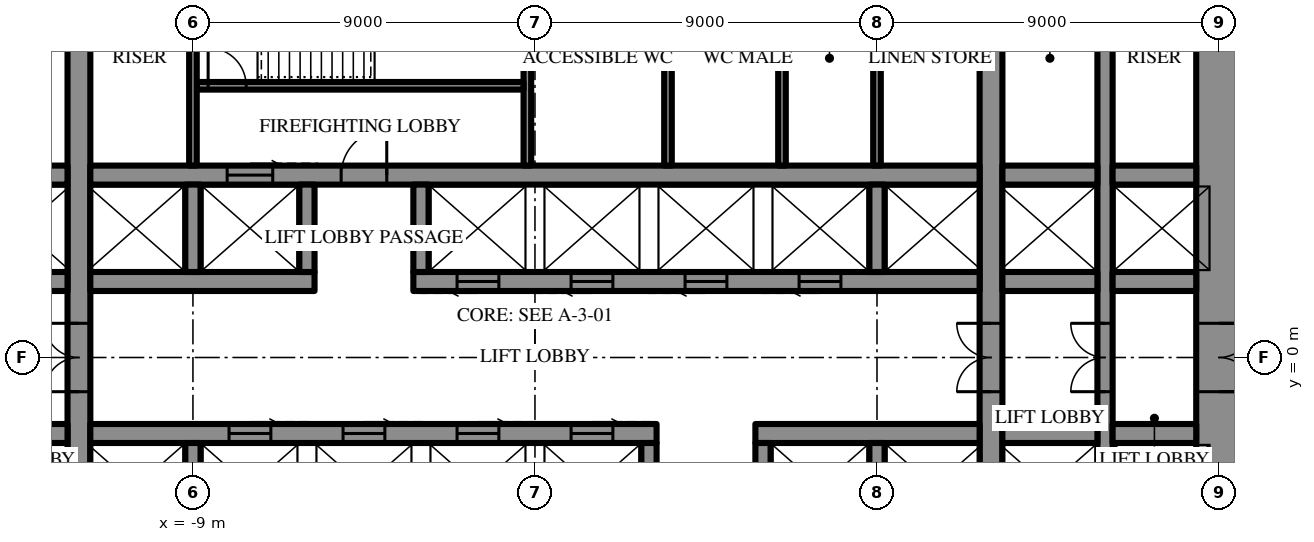
"""IFC4 building model, lengths in metres.
Left out: names, types, materials, properties, quantities, classifications, styles, units other than length and angle.
Written with IfcOpenShell. Run it as: python <this file> out.ifc"""

import sys

from ifc_helpers import new_model, si_unit, direction, frame, frame_2d, origin, place, context, subcontext, project, spatial, rectangle, extrude, element, fill, save


model = new_model("IFC4")
c1 = context("Model", 3, precision=1e-05, world=origin(), true_north=direction((0.0, 1.0)))
c2 = subcontext(c1, "Body", "Model", "MODEL_VIEW")
j1 = project(units=[si_unit("LENGTHUNIT", "METRE"), si_unit("PLANEANGLEUNIT", "RADIAN")], contexts=[c1])
p1 = place(None, origin())
s1 = spatial("IfcSite", under=j1, at=p1, CompositionType="ELEMENT")
p2 = place(p1, origin())
s2 = spatial("IfcBuilding", under=s1, at=p2, CompositionType="ELEMENT")
p3 = place(p2, frame((0.0, 0.0, 82.3)))
s3 = spatial("IfcBuildingStorey", under=s2, at=p3, CompositionType="ELEMENT", Elevation=82.3)
p4 = place(p3, frame((18.0, -10.7, 0.0), z_axis=(0.0, 0.0, 1.0), x_axis=(0.0, 1.0, 0.0)))
e1 = element("IfcWall", 1, at=p4, inside=s3, PredefinedType="SHEAR", context=c2, shape_type="SweptSolid", body=[
    extrude(rectangle(XDim=21.4, YDim=1.2, at=frame_2d((10.7, 0.0))), origin(), (0.0, 0.0, 1.0), 4.2),
])
p5 = place(p4, frame((9.8, 0.0, 0.0)))
e2 = element("IfcOpeningElement", 2, at=p5, cuts=e1, PredefinedType="OPENING", context=c2, shape_type="SweptSolid", body=[
    extrude(rectangle(XDim=1.8, YDim=2.4, at=frame_2d((0.9, 1.2))), frame((0.0, 0.61, 0.0), z_axis=(0.0, -1.0, 0.0), x_axis=(1.0, 0.0, 0.0)), (0.0, 0.0, 1.0), 1.22),
])
p6 = place(p3, frame((12.0, -10.7, 0.0), z_axis=(0.0, 0.0, 1.0), x_axis=(0.0, 1.0, 0.0)))
e3 = element("IfcWall", 3, at=p6, inside=s3, PredefinedType="SHEAR", context=c2, shape_type="SweptSolid", body=[
    extrude(rectangle(XDim=21.4, YDim=0.6, at=frame_2d((10.7, 0.0))), origin(), (0.0, 0.0, 1.0), 4.2),
])
p7 = place(p6, frame((9.8, 0.0, 0.0)))
e4 = element("IfcOpeningElement", 4, at=p7, cuts=e3, PredefinedType="OPENING", context=c2, shape_type="SweptSolid", body=[
    extrude(rectangle(XDim=1.8, YDim=2.4, at=frame_2d((0.9, 1.2))), frame((0.0, 0.31, 0.0), z_axis=(0.0, -1.0, 0.0), x_axis=(1.0, 0.0, 0.0)), (0.0, 0.0, 1.0), 0.62),
])
p8 = place(p3, frame((-12.0, -10.7, 0.0), z_axis=(0.0, 0.0, 1.0), x_axis=(0.0, 1.0, 0.0)))
e5 = element("IfcWall", 5, at=p8, inside=s3, PredefinedType="SHEAR", context=c2, shape_type="SweptSolid", body=[
    extrude(rectangle(XDim=21.4, YDim=0.6, at=frame_2d((10.7, 0.0))), origin(), (0.0, 0.0, 1.0), 4.2),
])
p9 = place(p8, frame((9.8, 0.0, 0.0)))
e6 = element("IfcOpeningElement", 6, at=p9, cuts=e5, PredefinedType="OPENING", context=c2, shape_type="SweptSolid", body=[
    extrude(rectangle(XDim=1.8, YDim=2.4, at=frame_2d((0.9, 1.2))), frame((0.0, 0.31, 0.0), z_axis=(0.0, -1.0, 0.0), x_axis=(1.0, 0.0, 0.0)), (0.0, 0.0, 1.0), 0.62),
])
p10 = place(p3, frame((15.0, -10.7, 0.0), z_axis=(0.0, 0.0, 1.0), x_axis=(0.0, 1.0, 0.0)))
e7 = element("IfcWall", 7, at=p10, inside=s3, PredefinedType="SHEAR", context=c2, shape_type="SweptSolid", body=[
    extrude(rectangle(XDim=21.4, YDim=0.4, at=frame_2d((10.7, 0.0))), origin(), (0.0, 0.0, 1.0), 4.2),
])
p11 = place(p10, frame((9.8, 0.0, 0.0)))
e8 = element("IfcOpeningElement", 8, at=p11, cuts=e7, PredefinedType="OPENING", context=c2, shape_type="SweptSolid", body=[
    extrude(rectangle(XDim=1.8, YDim=2.4, at=frame_2d((0.9, 1.2))), frame((0.0, 0.21, 0.0), z_axis=(0.0, -1.0, 0.0), x_axis=(1.0, 0.0, 0.0)), (0.0, 0.0, 1.0), 0.42),
])
p12 = place(p3, frame((-14.8, 2.0, 0.0), z_axis=(0.0, 0.0, 1.0), x_axis=(1.0, 0.0, 0.0)))
e9 = element("IfcWall", 9, at=p12, inside=s3, PredefinedType="SHEAR", context=c2, shape_type="SweptSolid", body=[
    extrude(rectangle(XDim=2.5, YDim=0.5, at=frame_2d((1.25, 0.0))), origin(), (0.0, 0.0, 1.0), 4.2),
])
p13 = place(p3, frame((-11.7, 2.0, 0.0), z_axis=(0.0, 0.0, 1.0), x_axis=(1.0, 0.0, 0.0)))
e10 = element("IfcWall", 10, at=p13, inside=s3, PredefinedType="SHEAR", context=c2, shape_type="SweptSolid", body=[
    extrude(rectangle(XDim=5.9, YDim=0.5, at=frame_2d((2.95, 0.0))), origin(), (0.0, 0.0, 1.0), 4.2),
])
p14 = place(p3, frame((-3.2, 2.0, 0.0), z_axis=(0.0, 0.0, 1.0), x_axis=(1.0, 0.0, 0.0)))
e11 = element("IfcWall", 11, at=p14, inside=s3, PredefinedType="SHEAR", context=c2, shape_type="SweptSolid", body=[
    extrude(rectangle(XDim=14.9, YDim=0.5, at=frame_2d((7.45, 0.0))), origin(), (0.0, 0.0, 1.0), 4.2),
])
p15 = place(p14, frame((1.15, 0.0, 0.0)))
e12 = element("IfcOpeningElement", 12, at=p15, cuts=e11, PredefinedType="OPENING", context=c2, shape_type="SweptSolid", body=[
    extrude(rectangle(XDim=1.1, YDim=2.2, at=frame_2d((0.55, 1.1))), frame((0.0, 0.26, 0.0), z_axis=(0.0, -1.0, 0.0), x_axis=(1.0, 0.0, 0.0)), (0.0, 0.0, 1.0), 0.52),
])
p16 = place(p14, frame((4.15, 0.0, 0.0)))
e13 = element("IfcOpeningElement", 13, at=p16, cuts=e11, PredefinedType="OPENING", context=c2, shape_type="SweptSolid", body=[
    extrude(rectangle(XDim=1.1, YDim=2.2, at=frame_2d((0.55, 1.1))), frame((0.0, 0.26, 0.0), z_axis=(0.0, -1.0, 0.0), x_axis=(1.0, 0.0, 0.0)), (0.0, 0.0, 1.0), 0.52),
])
p17 = place(p14, frame((7.15, 0.0, 0.0)))
e14 = element("IfcOpeningElement", 14, at=p17, cuts=e11, PredefinedType="OPENING", context=c2, shape_type="SweptSolid", body=[
    extrude(rectangle(XDim=1.1, YDim=2.2, at=frame_2d((0.55, 1.1))), frame((0.0, 0.26, 0.0), z_axis=(0.0, -1.0, 0.0), x_axis=(1.0, 0.0, 0.0)), (0.0, 0.0, 1.0), 0.52),
])
p18 = place(p14, frame((10.15, 0.0, 0.0)))
e15 = element("IfcOpeningElement", 15, at=p18, cuts=e11, PredefinedType="OPENING", context=c2, shape_type="SweptSolid", body=[
    extrude(rectangle(XDim=1.1, YDim=2.2, at=frame_2d((0.55, 1.1))), frame((0.0, 0.26, 0.0), z_axis=(0.0, -1.0, 0.0), x_axis=(1.0, 0.0, 0.0)), (0.0, 0.0, 1.0), 0.52),
])
p19 = place(p3, frame((12.3, 2.0, 0.0), z_axis=(0.0, 0.0, 1.0), x_axis=(1.0, 0.0, 0.0)))
e16 = element("IfcWall", 16, at=p19, inside=s3, PredefinedType="SHEAR", context=c2, shape_type="SweptSolid", body=[
    extrude(rectangle(XDim=2.5, YDim=0.5, at=frame_2d((1.25, 0.0))), origin(), (0.0, 0.0, 1.0), 4.2),
])
p20 = place(p3, frame((15.2, 2.0, 0.0), z_axis=(0.0, 0.0, 1.0), x_axis=(1.0, 0.0, 0.0)))
e17 = element("IfcWall", 17, at=p20, inside=s3, PredefinedType="SHEAR", context=c2, shape_type="SweptSolid", body=[
    extrude(rectangle(XDim=2.2, YDim=0.5, at=frame_2d((1.1, 0.0))), origin(), (0.0, 0.0, 1.0), 4.2),
])
p21 = place(p3, frame((-14.8, 4.8, 0.0), z_axis=(0.0, 0.0, 1.0), x_axis=(1.0, 0.0, 0.0)))
e18 = element("IfcWall", 18, at=p21, inside=s3, PredefinedType="SHEAR", context=c2, shape_type="SweptSolid", body=[
    extrude(rectangle(XDim=2.5, YDim=0.5, at=frame_2d((1.25, 0.0))), origin(), (0.0, 0.0, 1.0), 4.2),
])
p22 = place(p3, frame((-11.7, 4.8, 0.0), z_axis=(0.0, 0.0, 1.0), x_axis=(1.0, 0.0, 0.0)))
e19 = element("IfcWall", 19, at=p22, inside=s3, PredefinedType="SHEAR", context=c2, shape_type="SweptSolid", body=[
    extrude(rectangle(XDim=23.4, YDim=0.5, at=frame_2d((11.7, 0.0))), origin(), (0.0, 0.0, 1.0), 4.2),
])
p23 = place(p22, frame((6.6, 0.0, 0.0)))
e20 = element("IfcOpeningElement", 20, at=p23, cuts=e19, PredefinedType="OPENING", context=c2, shape_type="SweptSolid", body=[
    extrude(rectangle(XDim=1.2, YDim=2.2, at=frame_2d((0.6, 1.1))), frame((0.0, 0.26, 0.0), z_axis=(0.0, -1.0, 0.0), x_axis=(1.0, 0.0, 0.0)), (0.0, 0.0, 1.0), 0.52),
])
p24 = place(p22, frame((3.6, 0.0, 0.0)))
e21 = element("IfcOpeningElement", 21, at=p24, cuts=e19, PredefinedType="OPENING", context=c2, shape_type="SweptSolid", body=[
    extrude(rectangle(XDim=1.2, YDim=2.2, at=frame_2d((0.6, 1.1))), frame((0.0, 0.26, 0.0), z_axis=(0.0, -1.0, 0.0), x_axis=(1.0, 0.0, 0.0)), (0.0, 0.0, 1.0), 0.52),
])
p25 = place(p3, frame((12.3, 4.8, 0.0), z_axis=(0.0, 0.0, 1.0), x_axis=(1.0, 0.0, 0.0)))
e22 = element("IfcWall", 22, at=p25, inside=s3, PredefinedType="SHEAR", context=c2, shape_type="SweptSolid", body=[
    extrude(rectangle(XDim=2.5, YDim=0.5, at=frame_2d((1.25, 0.0))), origin(), (0.0, 0.0, 1.0), 4.2),
])
p26 = place(p3, frame((15.2, 4.8, 0.0), z_axis=(0.0, 0.0, 1.0), x_axis=(1.0, 0.0, 0.0)))
e23 = element("IfcWall", 23, at=p26, inside=s3, PredefinedType="SHEAR", context=c2, shape_type="SweptSolid", body=[
    extrude(rectangle(XDim=2.2, YDim=0.5, at=frame_2d((1.1, 0.0))), origin(), (0.0, 0.0, 1.0), 4.2),
])
for number, where, z_axis, x_axis in (
    (24, (-9.0, 2.25, 0.0), (0.0, 0.0, 1.0), (0.0, 1.0, 0.0)),
    (25, (-6.0, 2.25, 0.0), (0.0, 0.0, 1.0), (0.0, 1.0, 0.0)),
    (26, (-3.0, 2.25, 0.0), (0.0, 0.0, 1.0), (0.0, 1.0, 0.0)),
    (27, (9.0, 2.25, 0.0), (0.0, 0.0, 1.0), (0.0, 1.0, 0.0)),
):
    element("IfcWall", number, at=place(p3, frame(where, z_axis=z_axis, x_axis=x_axis)), inside=s3, PredefinedType="SHEAR", context=c2, shape_type="SweptSolid", body=[
        extrude(rectangle(XDim=2.3, YDim=0.4, at=frame_2d((1.15, 0.0))), origin(), (0.0, 0.0, 1.0), 4.2),
    ])
p27 = place(p3, frame((-0.2, 5.05, 0.0), z_axis=(0.0, 0.0, 1.0), x_axis=(0.0, 1.0, 0.0)))
e28 = element("IfcWall", 28, at=p27, inside=s3, PredefinedType="SHEAR", context=c2, shape_type="SweptSolid", body=[
    extrude(rectangle(XDim=5.65, YDim=0.2, at=frame_2d((2.825, 0.0))), origin(), (0.0, 0.0, 1.0), 4.2),
])
p28 = place(p3, frame((-8.9, 7.15, 0.0), z_axis=(0.0, 0.0, 1.0), x_axis=(1.0, 0.0, 0.0)))
e29 = element("IfcWall", 29, at=p28, inside=s3, PredefinedType="SHEAR", context=c2, shape_type="SweptSolid", body=[
    extrude(rectangle(XDim=8.6, YDim=0.2, at=frame_2d((4.3, 0.0))), origin(), (0.0, 0.0, 1.0), 4.2),
])
p29 = place(p28, frame((0.3, 0.0, 0.0)))
e30 = element("IfcOpeningElement", 30, at=p29, cuts=e29, PredefinedType="OPENING", context=c2, shape_type="SweptSolid", body=[
    extrude(rectangle(XDim=1.0, YDim=2.2, at=frame_2d((0.5, 1.1))), frame((0.0, 0.11, 0.0), z_axis=(0.0, -1.0, 0.0), x_axis=(1.0, 0.0, 0.0)), (0.0, 0.0, 1.0), 0.22),
])
p30 = place(p3, frame((17.4, -2.0, 0.0), z_axis=(0.0, 0.0, 1.0), x_axis=(-1.0, 0.0, 0.0)))
e31 = element("IfcWall", 31, at=p30, inside=s3, PredefinedType="SHEAR", context=c2, shape_type="SweptSolid", body=[
    extrude(rectangle(XDim=2.2, YDim=0.5, at=frame_2d((1.1, 0.0))), origin(), (0.0, 0.0, 1.0), 4.2),
])
p31 = place(p3, frame((14.8, -2.0, 0.0), z_axis=(0.0, 0.0, 1.0), x_axis=(-1.0, 0.0, 0.0)))
e32 = element("IfcWall", 32, at=p31, inside=s3, PredefinedType="SHEAR", context=c2, shape_type="SweptSolid", body=[
    extrude(rectangle(XDim=2.5, YDim=0.5, at=frame_2d((1.25, 0.0))), origin(), (0.0, 0.0, 1.0), 4.2),
])
p32 = place(p3, frame((11.7, -2.0, 0.0), z_axis=(0.0, 0.0, 1.0), x_axis=(-1.0, 0.0, 0.0)))
e33 = element("IfcWall", 33, at=p32, inside=s3, PredefinedType="SHEAR", context=c2, shape_type="SweptSolid", body=[
    extrude(rectangle(XDim=5.9, YDim=0.5, at=frame_2d((2.95, 0.0))), origin(), (0.0, 0.0, 1.0), 4.2),
])
p33 = place(p3, frame((3.2, -2.0, 0.0), z_axis=(0.0, 0.0, 1.0), x_axis=(-1.0, 0.0, 0.0)))
e34 = element("IfcWall", 34, at=p33, inside=s3, PredefinedType="SHEAR", context=c2, shape_type="SweptSolid", body=[
    extrude(rectangle(XDim=14.9, YDim=0.5, at=frame_2d((7.45, 0.0))), origin(), (0.0, 0.0, 1.0), 4.2),
])
p34 = place(p33, frame((1.15, 0.0, 0.0)))
e35 = element("IfcOpeningElement", 35, at=p34, cuts=e34, PredefinedType="OPENING", context=c2, shape_type="SweptSolid", body=[
    extrude(rectangle(XDim=1.1, YDim=2.2, at=frame_2d((0.55, 1.1))), frame((0.0, 0.26, 0.0), z_axis=(0.0, -1.0, 0.0), x_axis=(1.0, 0.0, 0.0)), (0.0, 0.0, 1.0), 0.52),
])
p35 = place(p33, frame((4.15, 0.0, 0.0)))
e36 = element("IfcOpeningElement", 36, at=p35, cuts=e34, PredefinedType="OPENING", context=c2, shape_type="SweptSolid", body=[
    extrude(rectangle(XDim=1.1, YDim=2.2, at=frame_2d((0.55, 1.1))), frame((0.0, 0.26, 0.0), z_axis=(0.0, -1.0, 0.0), x_axis=(1.0, 0.0, 0.0)), (0.0, 0.0, 1.0), 0.52),
])
p36 = place(p33, frame((7.15, 0.0, 0.0)))
e37 = element("IfcOpeningElement", 37, at=p36, cuts=e34, PredefinedType="OPENING", context=c2, shape_type="SweptSolid", body=[
    extrude(rectangle(XDim=1.1, YDim=2.2, at=frame_2d((0.55, 1.1))), frame((0.0, 0.26, 0.0), z_axis=(0.0, -1.0, 0.0), x_axis=(1.0, 0.0, 0.0)), (0.0, 0.0, 1.0), 0.52),
])
p37 = place(p33, frame((10.15, 0.0, 0.0)))
e38 = element("IfcOpeningElement", 38, at=p37, cuts=e34, PredefinedType="OPENING", context=c2, shape_type="SweptSolid", body=[
    extrude(rectangle(XDim=1.1, YDim=2.2, at=frame_2d((0.55, 1.1))), frame((0.0, 0.26, 0.0), z_axis=(0.0, -1.0, 0.0), x_axis=(1.0, 0.0, 0.0)), (0.0, 0.0, 1.0), 0.52),
])
p38 = place(p3, frame((-12.3, -2.0, 0.0), z_axis=(0.0, 0.0, 1.0), x_axis=(-1.0, 0.0, 0.0)))
e39 = element("IfcWall", 39, at=p38, inside=s3, PredefinedType="SHEAR", context=c2, shape_type="SweptSolid", body=[
    extrude(rectangle(XDim=2.5, YDim=0.5, at=frame_2d((1.25, 0.0))), origin(), (0.0, 0.0, 1.0), 4.2),
])
for number, where, z_axis, x_axis in (
    (40, (9.0, -2.25, 0.0), (0.0, 0.0, 1.0), (0.0, -1.0, 0.0)),
    (41, (6.0, -2.25, 0.0), (0.0, 0.0, 1.0), (0.0, -1.0, 0.0)),
    (42, (3.0, -2.25, 0.0), (0.0, 0.0, 1.0), (0.0, -1.0, 0.0)),
    (43, (-9.0, -2.25, 0.0), (0.0, 0.0, 1.0), (0.0, -1.0, 0.0)),
):
    element("IfcWall", number, at=place(p3, frame(where, z_axis=z_axis, x_axis=x_axis)), inside=s3, PredefinedType="SHEAR", context=c2, shape_type="SweptSolid", body=[
        extrude(rectangle(XDim=2.3, YDim=0.4, at=frame_2d((1.15, 0.0))), origin(), (0.0, 0.0, 1.0), 4.2),
    ])
for number, where, z_axis, x_axis in (
    (44, (-9.0, 5.05, 0.0), (0.0, 0.0, 1.0), (0.0, 1.0, 0.0)),
    (45, (9.0, 5.05, 0.0), (0.0, 0.0, 1.0), (0.0, 1.0, 0.0)),
    (46, (3.5, 5.05, 0.0), (0.0, 0.0, 1.0), (0.0, 1.0, 0.0)),
    (47, (6.5, 5.05, 0.0), (0.0, 0.0, 1.0), (0.0, 1.0, 0.0)),
):
    element("IfcWall", number, at=place(p3, frame(where, z_axis=z_axis, x_axis=x_axis)), inside=s3, PredefinedType="PARTITIONING", context=c2, shape_type="SweptSolid", body=[
        extrude(rectangle(XDim=5.65, YDim=0.2, at=frame_2d((2.825, 0.0))), origin(), (0.0, 0.0, 1.0), 4.0),
    ])
p39 = place(p5, frame((1.8, 0.0, 0.0), z_axis=(0.0, 0.0, 1.0), x_axis=(-1.0, 0.0, 0.0)))
e48 = element("IfcDoor", 48, at=p39, inside=s3, OperationType="DOUBLE_DOOR_SINGLE_SWING", PredefinedType="DOOR", context=c2, shape_type="SweptSolid", body=[
    extrude(rectangle(XDim=1.8, YDim=2.4, at=frame_2d((0.9, 1.2))), frame((0.0, 0.025, 0.0), z_axis=(0.0, -1.0, 0.0), x_axis=(1.0, 0.0, 0.0)), (0.0, 0.0, 1.0), 0.05),
])
fill(e2, e48)
p40 = place(p23, origin())
e49 = element("IfcDoor", 49, at=p40, inside=s3, OperationType="SINGLE_SWING_LEFT", PredefinedType="DOOR", context=c2, shape_type="SweptSolid", body=[
    extrude(rectangle(XDim=1.2, YDim=2.2, at=frame_2d((0.6, 1.1))), frame((0.0, 0.025, 0.0), z_axis=(0.0, -1.0, 0.0), x_axis=(1.0, 0.0, 0.0)), (0.0, 0.0, 1.0), 0.05),
])
fill(e20, e49)
p41 = place(p29, origin())
e50 = element("IfcDoor", 50, at=p41, inside=s3, OperationType="SINGLE_SWING_RIGHT", PredefinedType="DOOR", context=c2, shape_type="SweptSolid", body=[
    extrude(rectangle(XDim=1.0, YDim=2.2, at=frame_2d((0.5, 1.1))), frame((0.0, 0.025, 0.0), z_axis=(0.0, -1.0, 0.0), x_axis=(1.0, 0.0, 0.0)), (0.0, 0.0, 1.0), 0.05),
])
fill(e30, e50)
p42 = place(p7, origin())
e51 = element("IfcDoor", 51, at=p42, inside=s3, OperationType="DOUBLE_DOOR_SINGLE_SWING", PredefinedType="DOOR", context=c2, shape_type="SweptSolid", body=[
    extrude(rectangle(XDim=1.8, YDim=2.4, at=frame_2d((0.9, 1.2))), frame((0.0, 0.025, 0.0), z_axis=(0.0, -1.0, 0.0), x_axis=(1.0, 0.0, 0.0)), (0.0, 0.0, 1.0), 0.05),
])
fill(e4, e51)
p43 = place(p9, origin())
e52 = element("IfcDoor", 52, at=p43, inside=s3, OperationType="DOUBLE_DOOR_SINGLE_SWING", PredefinedType="DOOR", context=c2, shape_type="SweptSolid", body=[
    extrude(rectangle(XDim=1.8, YDim=2.4, at=frame_2d((0.9, 1.2))), frame((0.0, 0.025, 0.0), z_axis=(0.0, -1.0, 0.0), x_axis=(1.0, 0.0, 0.0)), (0.0, 0.0, 1.0), 0.05),
])
fill(e6, e52)
p44 = place(p11, origin())
e53 = element("IfcDoor", 53, at=p44, inside=s3, OperationType="DOUBLE_DOOR_SINGLE_SWING", PredefinedType="DOOR", context=c2, shape_type="SweptSolid", body=[
    extrude(rectangle(XDim=1.8, YDim=2.4, at=frame_2d((0.9, 1.2))), frame((0.0, 0.025, 0.0), z_axis=(0.0, -1.0, 0.0), x_axis=(1.0, 0.0, 0.0)), (0.0, 0.0, 1.0), 0.05),
])
fill(e8, e53)
p45 = place(p24, origin())
e54 = element("IfcDoor", 54, at=p45, inside=s3, OperationType="SLIDING_TO_LEFT", PredefinedType="DOOR", context=c2, shape_type="SweptSolid", body=[
    extrude(rectangle(XDim=1.2, YDim=2.2, at=frame_2d((0.6, 1.1))), frame((0.0, 0.025, 0.0), z_axis=(0.0, -1.0, 0.0), x_axis=(1.0, 0.0, 0.0)), (0.0, 0.0, 1.0), 0.05),
])
fill(e21, e54)
p46 = place(p15, frame((1.1, 0.0, 0.0), z_axis=(0.0, 0.0, 1.0), x_axis=(-1.0, 0.0, 0.0)))
e55 = element("IfcDoor", 55, at=p46, inside=s3, OperationType="SLIDING_TO_LEFT", PredefinedType="DOOR", context=c2, shape_type="SweptSolid", body=[
    extrude(rectangle(XDim=1.1, YDim=2.2, at=frame_2d((0.55, 1.1))), frame((0.0, 0.025, 0.0), z_axis=(0.0, -1.0, 0.0), x_axis=(1.0, 0.0, 0.0)), (0.0, 0.0, 1.0), 0.05),
])
fill(e12, e55)
p47 = place(p16, frame((1.1, 0.0, 0.0), z_axis=(0.0, 0.0, 1.0), x_axis=(-1.0, 0.0, 0.0)))
e56 = element("IfcDoor", 56, at=p47, inside=s3, OperationType="SLIDING_TO_LEFT", PredefinedType="DOOR", context=c2, shape_type="SweptSolid", body=[
    extrude(rectangle(XDim=1.1, YDim=2.2, at=frame_2d((0.55, 1.1))), frame((0.0, 0.025, 0.0), z_axis=(0.0, -1.0, 0.0), x_axis=(1.0, 0.0, 0.0)), (0.0, 0.0, 1.0), 0.05),
])
fill(e13, e56)
p48 = place(p17, frame((1.1, 0.0, 0.0), z_axis=(0.0, 0.0, 1.0), x_axis=(-1.0, 0.0, 0.0)))
e57 = element("IfcDoor", 57, at=p48, inside=s3, OperationType="SLIDING_TO_LEFT", PredefinedType="DOOR", context=c2, shape_type="SweptSolid", body=[
    extrude(rectangle(XDim=1.1, YDim=2.2, at=frame_2d((0.55, 1.1))), frame((0.0, 0.025, 0.0), z_axis=(0.0, -1.0, 0.0), x_axis=(1.0, 0.0, 0.0)), (0.0, 0.0, 1.0), 0.05),
])
fill(e14, e57)
p49 = place(p18, frame((1.1, 0.0, 0.0), z_axis=(0.0, 0.0, 1.0), x_axis=(-1.0, 0.0, 0.0)))
e58 = element("IfcDoor", 58, at=p49, inside=s3, OperationType="SLIDING_TO_LEFT", PredefinedType="DOOR", context=c2, shape_type="SweptSolid", body=[
    extrude(rectangle(XDim=1.1, YDim=2.2, at=frame_2d((0.55, 1.1))), frame((0.0, 0.025, 0.0), z_axis=(0.0, -1.0, 0.0), x_axis=(1.0, 0.0, 0.0)), (0.0, 0.0, 1.0), 0.05),
])
fill(e15, e58)
p50 = place(p34, frame((1.1, 0.0, 0.0), z_axis=(0.0, 0.0, 1.0), x_axis=(-1.0, 0.0, 0.0)))
e59 = element("IfcDoor", 59, at=p50, inside=s3, OperationType="SLIDING_TO_LEFT", PredefinedType="DOOR", context=c2, shape_type="SweptSolid", body=[
    extrude(rectangle(XDim=1.1, YDim=2.2, at=frame_2d((0.55, 1.1))), frame((0.0, 0.025, 0.0), z_axis=(0.0, -1.0, 0.0), x_axis=(1.0, 0.0, 0.0)), (0.0, 0.0, 1.0), 0.05),
])
fill(e35, e59)
p51 = place(p35, frame((1.1, 0.0, 0.0), z_axis=(0.0, 0.0, 1.0), x_axis=(-1.0, 0.0, 0.0)))
e60 = element("IfcDoor", 60, at=p51, inside=s3, OperationType="SLIDING_TO_LEFT", PredefinedType="DOOR", context=c2, shape_type="SweptSolid", body=[
    extrude(rectangle(XDim=1.1, YDim=2.2, at=frame_2d((0.55, 1.1))), frame((0.0, 0.025, 0.0), z_axis=(0.0, -1.0, 0.0), x_axis=(1.0, 0.0, 0.0)), (0.0, 0.0, 1.0), 0.05),
])
fill(e36, e60)
p52 = place(p36, frame((1.1, 0.0, 0.0), z_axis=(0.0, 0.0, 1.0), x_axis=(-1.0, 0.0, 0.0)))
e61 = element("IfcDoor", 61, at=p52, inside=s3, OperationType="SLIDING_TO_LEFT", PredefinedType="DOOR", context=c2, shape_type="SweptSolid", body=[
    extrude(rectangle(XDim=1.1, YDim=2.2, at=frame_2d((0.55, 1.1))), frame((0.0, 0.025, 0.0), z_axis=(0.0, -1.0, 0.0), x_axis=(1.0, 0.0, 0.0)), (0.0, 0.0, 1.0), 0.05),
])
fill(e37, e61)
p53 = place(p37, frame((1.1, 0.0, 0.0), z_axis=(0.0, 0.0, 1.0), x_axis=(-1.0, 0.0, 0.0)))
e62 = element("IfcDoor", 62, at=p53, inside=s3, OperationType="SLIDING_TO_LEFT", PredefinedType="DOOR", context=c2, shape_type="SweptSolid", body=[
    extrude(rectangle(XDim=1.1, YDim=2.2, at=frame_2d((0.55, 1.1))), frame((0.0, 0.025, 0.0), z_axis=(0.0, -1.0, 0.0), x_axis=(1.0, 0.0, 0.0)), (0.0, 0.0, 1.0), 0.05),
])
fill(e38, e62)
save(model, sys.argv[1])
